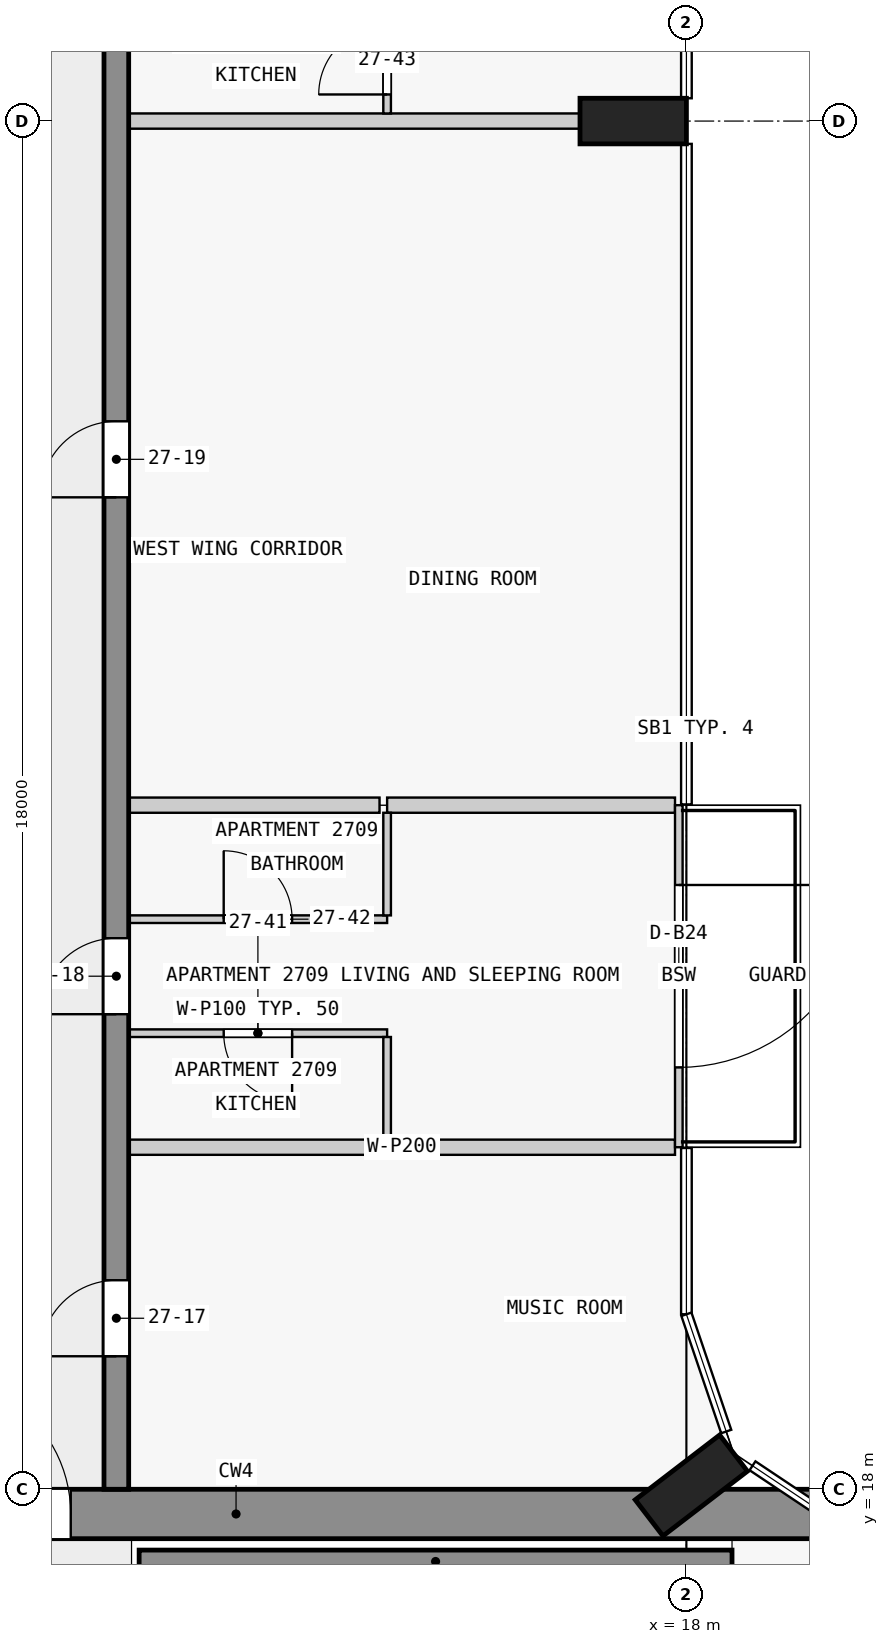
"""IFC4 building model, lengths in metres.
Left out: names, types, materials, properties, quantities, classifications, styles, units other than length and angle.
Written with IfcOpenShell. Run it as: python <this file> out.ifc"""

import sys

from ifc_helpers import new_model, si_unit, direction, frame, frame_2d, origin, origin_2d, place, context, subcontext, project, spatial, rectangle, extrude, element, fill, save


model = new_model("IFC4")
c1 = context("Model", 3, precision=1e-05, world=origin(), true_north=direction((0.0, 1.0)))
c2 = subcontext(c1, "Body", "Model", "MODEL_VIEW")
j1 = project(units=[si_unit("LENGTHUNIT", "METRE"), si_unit("PLANEANGLEUNIT", "RADIAN")], contexts=[c1])
p1 = place(None, origin())
s1 = spatial("IfcSite", under=j1, at=p1, CompositionType="ELEMENT")
p2 = place(p1, origin())
s2 = spatial("IfcBuilding", under=s1, at=p2, CompositionType="ELEMENT")
p3 = place(p2, frame((0.0, 0.0, 106.3)))
s3 = spatial("IfcBuildingStorey", under=s2, at=p3, CompositionType="ELEMENT", Elevation=106.3)
for number, where, z_axis, x_axis in (
    (1, (18.065, 18.05, 0.0), (0.0, 0.0, 1.0), (-0.609, 0.793, 0.0)),
    (2, (17.3, 36.0, 0.0), (0.0, 0.0, 1.0), (0.0, 1.0, 0.0)),
):
    element("IfcColumn", number, at=place(p3, frame(where, z_axis=z_axis, x_axis=x_axis)), inside=s3, PredefinedType="COLUMN", context=c2, shape_type="SweptSolid", body=[
        extrude(rectangle(XDim=0.6, YDim=1.4, at=origin_2d()), origin(), (0.0, 0.0, 1.0), 3.5),
    ])
p4 = place(p3, frame((1.65, 17.675, 0.0), z_axis=(0.0, 0.0, 1.0), x_axis=(1.0, 0.0, 0.0)))
e3 = element("IfcWall", 3, at=p4, inside=s3, PredefinedType="SHEAR", context=c2, shape_type="SweptSolid", body=[
    extrude(rectangle(XDim=20.85, YDim=0.65, at=frame_2d((10.425, 0.0))), origin(), (0.0, 0.0, 1.0), 3.25),
])
p5 = place(p4, frame((6.45, 0.0, 0.0)))
e4 = element("IfcOpeningElement", 4, at=p5, cuts=e3, PredefinedType="OPENING", context=c2, shape_type="SweptSolid", body=[
    extrude(rectangle(XDim=1.8, YDim=2.1, at=frame_2d((0.9, 1.05))), frame((0.0, 0.335, 0.0), z_axis=(0.0, -1.0, 0.0), x_axis=(1.0, 0.0, 0.0)), (0.0, 0.0, 1.0), 0.67),
])
p6 = place(p3, frame((10.8, 17.05, 0.0), z_axis=(0.0, 0.0, 1.0), x_axis=(1.0, 0.0, 0.0)))
e5 = element("IfcWall", 5, at=p6, inside=s3, PredefinedType="SHEAR", context=c2, shape_type="SweptSolid", body=[
    extrude(rectangle(XDim=7.8, YDim=0.3, at=frame_2d((3.9, 0.0))), origin(), (0.0, 0.0, 1.0), 3.25),
])
p7 = place(p3, frame((10.5, 18.0, 0.0), z_axis=(0.0, 0.0, 1.0), x_axis=(0.0, 1.0, 0.0)))
e6 = element("IfcWall", 6, at=p7, inside=s3, PredefinedType="SHEAR", context=c2, shape_type="SweptSolid", body=[
    extrude(rectangle(XDim=27.0, YDim=0.325, at=frame_2d((13.5, 0.0))), origin(), (0.0, 0.0, 1.0), 3.25),
])
p8 = place(p7, frame((1.75, 0.0, 0.0)))
e7 = element("IfcOpeningElement", 7, at=p8, cuts=e6, PredefinedType="OPENING", context=c2, shape_type="SweptSolid", body=[
    extrude(rectangle(XDim=1.0, YDim=2.1, at=frame_2d((0.5, 1.05))), frame((0.0, 0.172, 0.0), z_axis=(0.0, -1.0, 0.0), x_axis=(1.0, 0.0, 0.0)), (0.0, 0.0, 1.0), 0.345),
])
p9 = place(p7, frame((6.25, 0.0, 0.0)))
e8 = element("IfcOpeningElement", 8, at=p9, cuts=e6, PredefinedType="OPENING", context=c2, shape_type="SweptSolid", body=[
    extrude(rectangle(XDim=1.0, YDim=2.1, at=frame_2d((0.5, 1.05))), frame((0.0, 0.172, 0.0), z_axis=(0.0, -1.0, 0.0), x_axis=(1.0, 0.0, 0.0)), (0.0, 0.0, 1.0), 0.345),
])
p10 = place(p7, frame((13.05, 0.0, 0.0)))
e9 = element("IfcOpeningElement", 9, at=p10, cuts=e6, PredefinedType="OPENING", context=c2, shape_type="SweptSolid", body=[
    extrude(rectangle(XDim=1.0, YDim=2.1, at=frame_2d((0.5, 1.05))), frame((0.0, 0.172, 0.0), z_axis=(0.0, -1.0, 0.0), x_axis=(1.0, 0.0, 0.0)), (0.0, 0.0, 1.0), 0.345),
])
p11 = place(p7, frame((21.35, 0.0, 0.0)))
e10 = element("IfcOpeningElement", 10, at=p11, cuts=e6, PredefinedType="OPENING", context=c2, shape_type="SweptSolid", body=[
    extrude(rectangle(XDim=1.0, YDim=2.1, at=frame_2d((0.5, 1.05))), frame((0.0, 0.172, 0.0), z_axis=(0.0, -1.0, 0.0), x_axis=(1.0, 0.0, 0.0)), (0.0, 0.0, 1.0), 0.345),
])
p12 = place(p3, frame((17.9, 27.0, 0.0), z_axis=(0.0, 0.0, 1.0), x_axis=(0.0, -1.0, 0.0)))
e11 = element("IfcWall", 11, at=p12, inside=s3, PredefinedType="STANDARD", context=c2, shape_type="SweptSolid", body=[
    extrude(rectangle(XDim=4.5, YDim=0.1, at=frame_2d((2.25, 0.0))), origin(), (0.0, 0.0, 1.0), 3.25),
])
p13 = place(p12, frame((1.05, 0.0, 0.0)))
e12 = element("IfcOpeningElement", 12, at=p13, cuts=e11, PredefinedType="OPENING", context=c2, shape_type="SweptSolid", body=[
    extrude(rectangle(XDim=2.4, YDim=2.4, at=frame_2d((1.2, 1.2))), frame((0.0, 0.06, 0.0), z_axis=(0.0, -1.0, 0.0), x_axis=(1.0, 0.0, 0.0)), (0.0, 0.0, 1.0), 0.12),
])
p14 = place(p3, frame((17.85, 22.5, 0.0), z_axis=(0.0, 0.0, 1.0), x_axis=(-1.0, 0.0, 0.0)))
e13 = element("IfcWall", 13, at=p14, inside=s3, PredefinedType="PARTITIONING", context=c2, shape_type="SweptSolid", body=[
    extrude(rectangle(XDim=7.188, YDim=0.2, at=frame_2d((3.594, 0.0))), origin(), (0.0, 0.0, 1.0), 3.25),
])
p15 = place(p3, frame((14.062, 24.0, 0.0), z_axis=(0.0, 0.0, 1.0), x_axis=(-1.0, 0.0, 0.0)))
e14 = element("IfcWall", 14, at=p15, inside=s3, PredefinedType="PARTITIONING", context=c2, shape_type="SweptSolid", body=[
    extrude(rectangle(XDim=3.4, YDim=0.1, at=frame_2d((1.7, 0.0))), origin(), (0.0, 0.0, 1.0), 3.25),
])
p16 = place(p15, frame((1.25, 0.0, 0.0)))
e15 = element("IfcOpeningElement", 15, at=p16, cuts=e14, PredefinedType="OPENING", context=c2, shape_type="SweptSolid", body=[
    extrude(rectangle(XDim=0.9, YDim=2.1, at=frame_2d((0.45, 1.05))), frame((0.0, 0.06, 0.0), z_axis=(0.0, -1.0, 0.0), x_axis=(1.0, 0.0, 0.0)), (0.0, 0.0, 1.0), 0.12),
])
p17 = place(p3, frame((10.663, 25.5, 0.0), z_axis=(0.0, 0.0, 1.0), x_axis=(1.0, 0.0, 0.0)))
e16 = element("IfcWall", 16, at=p17, inside=s3, PredefinedType="PARTITIONING", context=c2, shape_type="SweptSolid", body=[
    extrude(rectangle(XDim=3.4, YDim=0.1, at=frame_2d((1.7, 0.0))), origin(), (0.0, 0.0, 1.0), 3.25),
])
p18 = place(p17, frame((1.25, 0.0, 0.0)))
e17 = element("IfcOpeningElement", 17, at=p18, cuts=e16, PredefinedType="OPENING", context=c2, shape_type="SweptSolid", body=[
    extrude(rectangle(XDim=0.9, YDim=2.1, at=frame_2d((0.45, 1.05))), frame((0.0, 0.06, 0.0), z_axis=(0.0, -1.0, 0.0), x_axis=(1.0, 0.0, 0.0)), (0.0, 0.0, 1.0), 0.12),
])
p19 = place(p3, frame((13.962, 27.0, 0.0), z_axis=(0.0, 0.0, 1.0), x_axis=(-1.0, 0.0, 0.0)))
e18 = element("IfcWall", 18, at=p19, inside=s3, PredefinedType="PARTITIONING", context=c2, shape_type="SweptSolid", body=[
    extrude(rectangle(XDim=3.3, YDim=0.2, at=frame_2d((1.65, 0.0))), origin(), (0.0, 0.0, 1.0), 3.25),
])
p20 = place(p3, frame((14.062, 27.0, 0.0), z_axis=(0.0, 0.0, 1.0), x_axis=(1.0, 0.0, 0.0)))
e19 = element("IfcWall", 19, at=p20, inside=s3, PredefinedType="PARTITIONING", context=c2, shape_type="SweptSolid", body=[
    extrude(rectangle(XDim=3.788, YDim=0.2, at=frame_2d((1.894, 0.0))), origin(), (0.0, 0.0, 1.0), 3.25),
])
p21 = place(p3, frame((16.6, 36.0, 0.0), z_axis=(0.0, 0.0, 1.0), x_axis=(-1.0, 0.0, 0.0)))
e20 = element("IfcWall", 20, at=p21, inside=s3, PredefinedType="PARTITIONING", context=c2, shape_type="SweptSolid", body=[
    extrude(rectangle(XDim=5.938, YDim=0.2, at=frame_2d((2.969, 0.0))), origin(), (0.0, 0.0, 1.0), 3.25),
])
for number, where, z_axis, x_axis in (
    (21, (14.062, 22.6, 0.0), (0.0, 0.0, 1.0), (0.0, 1.0, 0.0)),
    (22, (14.062, 25.55, 0.0), (0.0, 0.0, 1.0), (0.0, 1.0, 0.0)),
):
    element("IfcWall", number, at=place(p3, frame(where, z_axis=z_axis, x_axis=x_axis)), inside=s3, PredefinedType="PARTITIONING", context=c2, shape_type="SweptSolid", body=[
        extrude(rectangle(XDim=1.35, YDim=0.1, at=frame_2d((0.675, 0.0))), origin(), (0.0, 0.0, 1.0), 3.25),
    ])
p22 = place(p3, frame((14.062, 36.1, 0.0), z_axis=(0.0, 0.0, 1.0), x_axis=(0.0, 1.0, 0.0)))
e23 = element("IfcWall", 23, at=p22, inside=s3, PredefinedType="PARTITIONING", context=c2, shape_type="SweptSolid", body=[
    extrude(rectangle(XDim=1.45, YDim=0.1, at=frame_2d((0.725, 0.0))), origin(), (0.0, 0.0, 1.0), 3.25),
])
p23 = place(p22, frame((0.25, 0.0, 0.0)))
e24 = element("IfcOpeningElement", 24, at=p23, cuts=e23, PredefinedType="OPENING", context=c2, shape_type="SweptSolid", body=[
    extrude(rectangle(XDim=0.9, YDim=2.1, at=frame_2d((0.45, 1.05))), frame((0.0, 0.06, 0.0), z_axis=(0.0, -1.0, 0.0), x_axis=(1.0, 0.0, 0.0)), (0.0, 0.0, 1.0), 0.12),
])
p24 = place(p13, origin())
e25 = element("IfcDoor", 25, at=p24, inside=s3, OperationType="SINGLE_SWING_LEFT", PredefinedType="DOOR", context=c2, shape_type="SweptSolid", body=[
    extrude(rectangle(XDim=2.4, YDim=2.4, at=frame_2d((1.2, 1.2))), frame((0.0, 0.025, 0.0), z_axis=(0.0, -1.0, 0.0), x_axis=(1.0, 0.0, 0.0)), (0.0, 0.0, 1.0), 0.05),
])
fill(e12, e25)
p25 = place(p5, origin())
e26 = element("IfcDoor", 26, at=p25, inside=s3, OperationType="DOUBLE_DOOR_SINGLE_SWING", PredefinedType="DOOR", context=c2, shape_type="SweptSolid", body=[
    extrude(rectangle(XDim=1.8, YDim=2.1, at=frame_2d((0.9, 1.05))), frame((0.0, 0.025, 0.0), z_axis=(0.0, -1.0, 0.0), x_axis=(1.0, 0.0, 0.0)), (0.0, 0.0, 1.0), 0.05),
])
fill(e4, e26)
p26 = place(p8, origin())
e27 = element("IfcDoor", 27, at=p26, inside=s3, OperationType="SINGLE_SWING_LEFT", PredefinedType="DOOR", context=c2, shape_type="SweptSolid", body=[
    extrude(rectangle(XDim=1.0, YDim=2.1, at=frame_2d((0.5, 1.05))), frame((0.0, 0.025, 0.0), z_axis=(0.0, -1.0, 0.0), x_axis=(1.0, 0.0, 0.0)), (0.0, 0.0, 1.0), 0.05),
])
fill(e7, e27)
p27 = place(p9, origin())
e28 = element("IfcDoor", 28, at=p27, inside=s3, OperationType="SINGLE_SWING_LEFT", PredefinedType="DOOR", context=c2, shape_type="SweptSolid", body=[
    extrude(rectangle(XDim=1.0, YDim=2.1, at=frame_2d((0.5, 1.05))), frame((0.0, 0.025, 0.0), z_axis=(0.0, -1.0, 0.0), x_axis=(1.0, 0.0, 0.0)), (0.0, 0.0, 1.0), 0.05),
])
fill(e8, e28)
p28 = place(p10, origin())
e29 = element("IfcDoor", 29, at=p28, inside=s3, OperationType="SINGLE_SWING_RIGHT", PredefinedType="DOOR", context=c2, shape_type="SweptSolid", body=[
    extrude(rectangle(XDim=1.0, YDim=2.1, at=frame_2d((0.5, 1.05))), frame((0.0, 0.025, 0.0), z_axis=(0.0, -1.0, 0.0), x_axis=(1.0, 0.0, 0.0)), (0.0, 0.0, 1.0), 0.05),
])
fill(e9, e29)
p29 = place(p16, origin())
e30 = element("IfcDoor", 30, at=p29, inside=s3, OperationType="SINGLE_SWING_LEFT", PredefinedType="DOOR", context=c2, shape_type="SweptSolid", body=[
    extrude(rectangle(XDim=0.9, YDim=2.1, at=frame_2d((0.45, 1.05))), frame((0.0, 0.025, 0.0), z_axis=(0.0, -1.0, 0.0), x_axis=(1.0, 0.0, 0.0)), (0.0, 0.0, 1.0), 0.05),
])
fill(e15, e30)
p30 = place(p18, origin())
e31 = element("IfcDoor", 31, at=p30, inside=s3, OperationType="SINGLE_SWING_LEFT", PredefinedType="DOOR", context=c2, shape_type="SweptSolid", body=[
    extrude(rectangle(XDim=0.9, YDim=2.1, at=frame_2d((0.45, 1.05))), frame((0.0, 0.025, 0.0), z_axis=(0.0, -1.0, 0.0), x_axis=(1.0, 0.0, 0.0)), (0.0, 0.0, 1.0), 0.05),
])
fill(e17, e31)
p31 = place(p23, origin())
e32 = element("IfcDoor", 32, at=p31, inside=s3, OperationType="SINGLE_SWING_LEFT", PredefinedType="DOOR", context=c2, shape_type="SweptSolid", body=[
    extrude(rectangle(XDim=0.9, YDim=2.1, at=frame_2d((0.45, 1.05))), frame((0.0, 0.025, 0.0), z_axis=(0.0, -1.0, 0.0), x_axis=(1.0, 0.0, 0.0)), (0.0, 0.0, 1.0), 0.05),
])
fill(e24, e32)
save(model, sys.argv[1])
